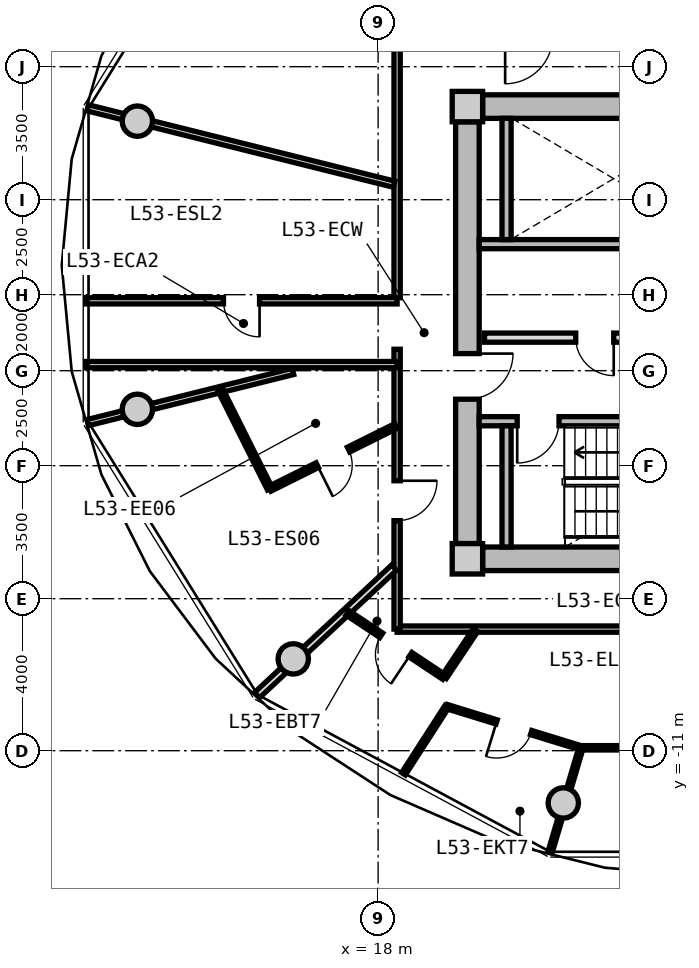
"""IFC4 building model, lengths in metres.
Left out: names, types, materials, properties, quantities, classifications, styles, units other than length and angle.
Written with IfcOpenShell. Run it as: python <this file> out.ifc"""

import sys

from ifc_helpers import new_model, si_unit, direction, frame, frame_2d, origin, origin_2d, place, context, subcontext, project, spatial, rectangle, circle, extrude, source, transform, mapped, element, fill, save


model = new_model("IFC4")
c1 = context("Model", 3, precision=1e-05, world=origin(), true_north=direction((0.0, 1.0)))
c2 = subcontext(c1, "Body", "Model", "MODEL_VIEW")
j1 = project(units=[si_unit("LENGTHUNIT", "METRE"), si_unit("PLANEANGLEUNIT", "RADIAN")], contexts=[c1])
p1 = place(None, origin())
s1 = spatial("IfcSite", under=j1, at=p1, CompositionType="ELEMENT")
p2 = place(p1, origin())
s2 = spatial("IfcBuilding", under=s1, at=p2, CompositionType="ELEMENT")
p3 = place(p2, frame((0.0, 0.0, 170.9)))
s3 = spatial("IfcBuildingStorey", under=s2, at=p3, CompositionType="ELEMENT", Elevation=170.9)
m1 = source(origin(), c2, "Body", "SweptSolid", [
    extrude(rectangle(XDim=0.8, YDim=0.8, at=origin_2d()), origin(), (0.0, 0.0, 1.0), 3.05),
])
for number, where, z_axis, x_axis in (
    (1, (20.35, -5.95, 0.0), (0.0, 0.0, 1.0), (1.0, 0.0, 0.0)),
    (2, (20.35, 5.95, 0.0), (0.0, 0.0, 1.0), (1.0, 0.0, 0.0)),
):
    element("IfcColumn", number, at=place(p3, frame(where, z_axis=z_axis, x_axis=x_axis)), inside=s3, PredefinedType="COLUMN", context=c2, shape_type="MappedRepresentation", body=[
        mapped(m1, transform((0.0, 0.0, 0.0), x_axis=(1.0, 0.0, 0.0), y_axis=(0.0, 1.0, 0.0), z_axis=(0.0, 0.0, 1.0), scale=1.0)),
    ])
m2 = source(origin(), c2, "Body", "SweptSolid", [
    extrude(rectangle(XDim=14.5, YDim=0.62, at=frame_2d((7.25, 0.0))), origin(), (0.0, 0.0, 1.0), 2.81),
])
for number, where, z_axis, x_axis in (
    (3, (20.75, 5.95, 0.0), (0.0, 0.0, 1.0), (1.0, 0.0, 0.0)),
    (4, (35.25, -5.95, 0.0), (0.0, 0.0, 1.0), (-1.0, 0.0, 0.0)),
):
    element("IfcWall", number, at=place(p3, frame(where, z_axis=z_axis, x_axis=x_axis)), inside=s3, PredefinedType="SHEAR", context=c2, shape_type="MappedRepresentation", body=[
        mapped(m2, transform((0.0, 0.0, 0.0), x_axis=(1.0, 0.0, 0.0), y_axis=(0.0, 1.0, 0.0), z_axis=(0.0, 0.0, 1.0), scale=1.0)),
    ])
m3 = source(origin(), c2, "Body", "SweptSolid", [
    extrude(rectangle(XDim=11.1, YDim=0.62, at=frame_2d((5.55, 0.0))), origin(), (0.0, 0.0, 1.0), 2.81),
])
p4 = place(p3, frame((20.35, -5.55, 0.0), z_axis=(0.0, 0.0, 1.0), x_axis=(0.0, 1.0, 0.0)))
e5 = element("IfcWall", 5, at=p4, inside=s3, PredefinedType="SHEAR", context=c2, shape_type="MappedRepresentation", body=[
    mapped(m3, transform((0.0, 0.0, 0.0), x_axis=(1.0, 0.0, 0.0), y_axis=(0.0, 1.0, 0.0), z_axis=(0.0, 0.0, 1.0), scale=1.0)),
])
p5 = place(p4, frame((3.8, 0.0, 0.0)))
e6 = element("IfcOpeningElement", 6, at=p5, cuts=e5, PredefinedType="OPENING", context=c2, shape_type="SweptSolid", body=[
    extrude(rectangle(XDim=1.2, YDim=2.15, at=frame_2d((0.6, 1.075))), frame((0.0, 0.32, 0.0), z_axis=(0.0, -1.0, 0.0), x_axis=(1.0, 0.0, 0.0)), (0.0, 0.0, 1.0), 0.64),
])
m4 = source(origin(), c2, "Body", "SweptSolid", [
    extrude(circle(Radius=0.4, at=origin_2d()), origin(), (0.0, 0.0, 1.0), 3.05),
])
for number, where, z_axis, x_axis in (
    (7, (11.665, 5.567, 0.0), (0.0, 0.0, 1.0), (1.0, 0.0, 0.0)),
    (8, (11.665, -2.016, 0.0), (0.0, 0.0, 1.0), (1.0, 0.0, 0.0)),
    (9, (15.767, -8.584, 0.0), (0.0, 0.0, 1.0), (1.0, 0.0, 0.0)),
    (10, (22.873, -12.375, 0.0), (0.0, 0.0, 1.0), (1.0, 0.0, 0.0)),
):
    element("IfcColumn", number, at=place(p3, frame(where, z_axis=z_axis, x_axis=x_axis)), inside=s3, PredefinedType="COLUMN", context=c2, shape_type="MappedRepresentation", body=[
        mapped(m4, transform((0.0, 0.0, 0.0), x_axis=(1.0, 0.0, 0.0), y_axis=(0.0, 1.0, 0.0), z_axis=(0.0, 0.0, 1.0), scale=1.0)),
    ])
m5 = source(origin(), c2, "Body", "SweptSolid", [
    extrude(rectangle(XDim=7.88, YDim=0.24, at=frame_2d((3.94, 0.0))), origin(), (0.0, 0.0, 1.0), 2.81),
])
p6 = place(p3, frame((20.66, 2.33, 0.0), z_axis=(0.0, 0.0, 1.0), x_axis=(1.0, 0.0, 0.0)))
e11 = element("IfcWall", 11, at=p6, inside=s3, PredefinedType="PARTITIONING", context=c2, shape_type="MappedRepresentation", body=[
    mapped(m5, transform((0.0, 0.0, 0.0), x_axis=(1.0, 0.0, 0.0), y_axis=(0.0, 1.0, 0.0), z_axis=(0.0, 0.0, 1.0), scale=1.0)),
])
m6 = source(origin(), c2, "Body", "SweptSolid", [
    extrude(rectangle(XDim=3.19, YDim=0.24, at=frame_2d((1.595, 0.0))), origin(), (0.0, 0.0, 1.0), 2.81),
])
p7 = place(p3, frame((21.38, 2.45, 0.0), z_axis=(0.0, 0.0, 1.0), x_axis=(0.0, 1.0, 0.0)))
e12 = element("IfcWall", 12, at=p7, inside=s3, PredefinedType="PARTITIONING", context=c2, shape_type="MappedRepresentation", body=[
    mapped(m6, transform((0.0, 0.0, 0.0), x_axis=(1.0, 0.0, 0.0), y_axis=(0.0, 1.0, 0.0), z_axis=(0.0, 0.0, 1.0), scale=1.0)),
])
p8 = place(p3, frame((20.66, -2.33, 0.0), z_axis=(0.0, 0.0, 1.0), x_axis=(1.0, 0.0, 0.0)))
e13 = element("IfcWall", 13, at=p8, inside=s3, PredefinedType="PARTITIONING", context=c2, shape_type="MappedRepresentation", body=[
    mapped(m5, transform((0.0, 0.0, 0.0), x_axis=(1.0, 0.0, 0.0), y_axis=(0.0, 1.0, 0.0), z_axis=(0.0, 0.0, 1.0), scale=1.0)),
])
p9 = place(p8, frame((1.0, 0.0, 0.0)))
e14 = element("IfcOpeningElement", 14, at=p9, cuts=e13, PredefinedType="OPENING", context=c2, shape_type="SweptSolid", body=[
    extrude(rectangle(XDim=1.1, YDim=2.15, at=frame_2d((0.55, 1.075))), frame((0.0, 0.13, 0.0), z_axis=(0.0, -1.0, 0.0), x_axis=(1.0, 0.0, 0.0)), (0.0, 0.0, 1.0), 0.26),
])
p10 = place(p3, frame((21.38, -5.64, 0.0), z_axis=(0.0, 0.0, 1.0), x_axis=(0.0, 1.0, 0.0)))
e15 = element("IfcWall", 15, at=p10, inside=s3, PredefinedType="PARTITIONING", context=c2, shape_type="MappedRepresentation", body=[
    mapped(m6, transform((0.0, 0.0, 0.0), x_axis=(1.0, 0.0, 0.0), y_axis=(0.0, 1.0, 0.0), z_axis=(0.0, 0.0, 1.0), scale=1.0)),
])
m7 = source(origin(), c2, "Body", "SweptSolid", [
    extrude(rectangle(XDim=7.62, YDim=0.24, at=frame_2d((3.81, 0.0))), origin(), (0.0, 0.0, 1.0), 2.795),
])
p11 = place(p3, frame((20.8, -0.13, 0.0), z_axis=(0.0, 0.0, 1.0), x_axis=(1.0, 0.0, 0.0)))
e16 = element("IfcWall", 16, at=p11, inside=s3, PredefinedType="PARTITIONING", context=c2, shape_type="MappedRepresentation", body=[
    mapped(m7, transform((0.0, 0.0, 0.0), x_axis=(1.0, 0.0, 0.0), y_axis=(0.0, 1.0, 0.0), z_axis=(0.0, 0.0, 1.0), scale=1.0)),
])
p12 = place(p11, frame((6.22, 0.0, 0.0)))
e17 = element("IfcOpeningElement", 17, at=p12, cuts=e16, PredefinedType="OPENING", context=c2, shape_type="SweptSolid", body=[
    extrude(rectangle(XDim=1.0, YDim=2.1, at=frame_2d((0.5, 1.05))), frame((0.0, 0.13, 0.0), z_axis=(0.0, -1.0, 0.0), x_axis=(1.0, 0.0, 0.0)), (0.0, 0.0, 1.0), 0.26),
])
p13 = place(p11, frame((2.4, 0.0, 0.0)))
e18 = element("IfcOpeningElement", 18, at=p13, cuts=e16, PredefinedType="OPENING", context=c2, shape_type="SweptSolid", body=[
    extrude(rectangle(XDim=1.0, YDim=2.1, at=frame_2d((0.5, 1.05))), frame((0.0, 0.13, 0.0), z_axis=(0.0, -1.0, 0.0), x_axis=(1.0, 0.0, 0.0)), (0.0, 0.0, 1.0), 0.26),
])
m8 = source(origin(), c2, "Body", "SweptSolid", [
    extrude(rectangle(XDim=19.0, YDim=0.165, at=frame_2d((9.5, 0.0))), origin(), (0.0, 0.0, 1.0), 2.795),
])
p14 = place(p3, frame((37.5, -7.8, 0.0), z_axis=(0.0, 0.0, 1.0), x_axis=(-1.0, 0.0, 0.0)))
e19 = element("IfcWall", 19, at=p14, inside=s3, PredefinedType="PARTITIONING", context=c2, shape_type="MappedRepresentation", body=[
    mapped(m8, transform((0.0, 0.0, 0.0), x_axis=(1.0, 0.0, 0.0), y_axis=(0.0, 1.0, 0.0), z_axis=(0.0, 0.0, 1.0), scale=1.0)),
])
p15 = place(p14, frame((8.061, 0.0, 0.0)))
e20 = element("IfcOpeningElement", 20, at=p15, cuts=e19, PredefinedType="OPENING", context=c2, shape_type="SweptSolid", body=[
    extrude(rectangle(XDim=1.05, YDim=2.15, at=frame_2d((0.525, 1.075))), frame((0.0, 0.093, 0.0), z_axis=(0.0, -1.0, 0.0), x_axis=(1.0, 0.0, 0.0)), (0.0, 0.0, 1.0), 0.185),
])
m9 = source(origin(), c2, "Body", "SweptSolid", [
    extrude(rectangle(XDim=7.365, YDim=0.165, at=frame_2d((3.682, 0.0))), origin(), (0.0, 0.0, 1.0), 2.795),
])
p16 = place(p3, frame((18.5, -7.8, 0.0), z_axis=(0.0, 0.0, 1.0), x_axis=(0.0, 1.0, 0.0)))
e21 = element("IfcWall", 21, at=p16, inside=s3, PredefinedType="PARTITIONING", context=c2, shape_type="MappedRepresentation", body=[
    mapped(m9, transform((0.0, 0.0, 0.0), x_axis=(1.0, 0.0, 0.0), y_axis=(0.0, 1.0, 0.0), z_axis=(0.0, 0.0, 1.0), scale=1.0)),
])
p17 = place(p16, frame((2.854, 0.0, 0.0)))
e22 = element("IfcOpeningElement", 22, at=p17, cuts=e21, PredefinedType="OPENING", context=c2, shape_type="SweptSolid", body=[
    extrude(rectangle(XDim=1.05, YDim=2.15, at=frame_2d((0.525, 1.075))), frame((0.0, 0.093, 0.0), z_axis=(0.0, -1.0, 0.0), x_axis=(1.0, 0.0, 0.0)), (0.0, 0.0, 1.0), 0.185),
])
m10 = source(origin(), c2, "Body", "SweptSolid", [
    extrude(rectangle(XDim=6.88, YDim=0.165, at=frame_2d((3.44, 0.0))), origin(), (0.0, 0.0, 1.0), 2.795),
])
p18 = place(p3, frame((18.5, 0.92, 0.0), z_axis=(0.0, 0.0, 1.0), x_axis=(0.0, 1.0, 0.0)))
e23 = element("IfcWall", 23, at=p18, inside=s3, PredefinedType="PARTITIONING", context=c2, shape_type="MappedRepresentation", body=[
    mapped(m10, transform((0.0, 0.0, 0.0), x_axis=(1.0, 0.0, 0.0), y_axis=(0.0, 1.0, 0.0), z_axis=(0.0, 0.0, 1.0), scale=1.0)),
])
m11 = source(origin(), c2, "Body", "SweptSolid", [
    extrude(rectangle(XDim=8.305, YDim=0.165, at=frame_2d((4.153, 0.0))), origin(), (0.0, 0.0, 1.0), 2.345),
])
p19 = place(p3, frame((18.42, 3.908, 0.0), z_axis=(0.0, 0.0, 1.0), x_axis=(-0.970309994378, 0.241864662175, 0.0)))
e24 = element("IfcWall", 24, at=p19, inside=s3, PredefinedType="PARTITIONING", context=c2, shape_type="MappedRepresentation", body=[
    mapped(m11, transform((0.0, 0.0, 0.0), x_axis=(1.0, 0.0, 0.0), y_axis=(0.0, 1.0, 0.0), z_axis=(0.0, 0.0, 1.0), scale=1.0)),
])
m12 = source(origin(), c2, "Body", "SweptSolid", [
    extrude(rectangle(XDim=5.564, YDim=0.165, at=frame_2d((2.782, 0.0))), origin(), (0.0, 0.0, 1.0), 2.345),
])
p20 = place(p3, frame((15.76, -1.02, 0.0), z_axis=(0.0, 0.0, 1.0), x_axis=(-0.970315176167, -0.241843872984, 0.0)))
e25 = element("IfcWall", 25, at=p20, inside=s3, PredefinedType="PARTITIONING", context=c2, shape_type="MappedRepresentation", body=[
    mapped(m12, transform((0.0, 0.0, 0.0), x_axis=(1.0, 0.0, 0.0), y_axis=(0.0, 1.0, 0.0), z_axis=(0.0, 0.0, 1.0), scale=1.0)),
])
m13 = source(origin(), c2, "Body", "SweptSolid", [
    extrude(rectangle(XDim=8.189, YDim=0.165, at=frame_2d((4.094, 0.0))), origin(), (0.0, 0.0, 1.0), 2.795),
])
p21 = place(p3, frame((10.311, 0.84, 0.0), z_axis=(0.0, 0.0, 1.0), x_axis=(1.0, 0.0, 0.0)))
e26 = element("IfcWall", 26, at=p21, inside=s3, PredefinedType="PARTITIONING", context=c2, shape_type="MappedRepresentation", body=[
    mapped(m13, transform((0.0, 0.0, 0.0), x_axis=(1.0, 0.0, 0.0), y_axis=(0.0, 1.0, 0.0), z_axis=(0.0, 0.0, 1.0), scale=1.0)),
])
p22 = place(p21, frame((3.619, 0.0, 0.0)))
e27 = element("IfcOpeningElement", 27, at=p22, cuts=e26, PredefinedType="OPENING", context=c2, shape_type="SweptSolid", body=[
    extrude(rectangle(XDim=0.95, YDim=2.1, at=frame_2d((0.475, 1.05))), frame((0.0, 0.093, 0.0), z_axis=(0.0, -1.0, 0.0), x_axis=(1.0, 0.0, 0.0)), (0.0, 0.0, 1.0), 0.185),
])
p23 = place(p3, frame((18.5, -0.84, 0.0), z_axis=(0.0, 0.0, 1.0), x_axis=(-1.0, 0.0, 0.0)))
e28 = element("IfcWall", 28, at=p23, inside=s3, PredefinedType="PARTITIONING", context=c2, shape_type="MappedRepresentation", body=[
    mapped(m13, transform((0.0, 0.0, 0.0), x_axis=(1.0, 0.0, 0.0), y_axis=(0.0, 1.0, 0.0), z_axis=(0.0, 0.0, 1.0), scale=1.0)),
])
m14 = source(origin(), c2, "Body", "SweptSolid", [
    extrude(rectangle(XDim=4.927, YDim=0.19, at=frame_2d((2.463, 0.0))), origin(), (0.0, 0.0, 1.0), 2.345),
])
p24 = place(p3, frame((18.42, -6.183, 0.0), z_axis=(0.0, 0.0, 1.0), x_axis=(-0.732191335987, -0.681098999783, 0.0)))
e29 = element("IfcWall", 29, at=p24, inside=s3, PredefinedType="PARTITIONING", context=c2, shape_type="MappedRepresentation", body=[
    mapped(m14, transform((0.0, 0.0, 0.0), x_axis=(1.0, 0.0, 0.0), y_axis=(0.0, 1.0, 0.0), z_axis=(0.0, 0.0, 1.0), scale=1.0)),
])
m15 = source(origin(), c2, "Body", "SweptSolid", [
    extrude(rectangle(XDim=3.707, YDim=0.14, at=frame_2d((1.854, 0.0))), origin(), (0.0, 0.0, 1.0), 2.795),
])
p25 = place(p3, frame((18.47, -2.456, 0.0), z_axis=(0.0, 0.0, 1.0), x_axis=(-0.895347377717, -0.44536846904, 0.0)))
e30 = element("IfcWall", 30, at=p25, inside=s3, PredefinedType="PARTITIONING", context=c2, shape_type="MappedRepresentation", body=[
    mapped(m15, transform((0.0, 0.0, 0.0), x_axis=(1.0, 0.0, 0.0), y_axis=(0.0, 1.0, 0.0), z_axis=(0.0, 0.0, 1.0), scale=1.0)),
])
p26 = place(p25, frame((1.394, 0.0, 0.0)))
e31 = element("IfcOpeningElement", 31, at=p26, cuts=e30, PredefinedType="OPENING", context=c2, shape_type="SweptSolid", body=[
    extrude(rectangle(XDim=0.92, YDim=2.1, at=frame_2d((0.46, 1.05))), frame((0.0, 0.08, 0.0), z_axis=(0.0, -1.0, 0.0), x_axis=(1.0, 0.0, 0.0)), (0.0, 0.0, 1.0), 0.16),
])
m16 = source(origin(), c2, "Body", "SweptSolid", [
    extrude(rectangle(XDim=2.918, YDim=0.14, at=frame_2d((1.459, 0.0))), origin(), (0.0, 0.0, 1.0), 2.795),
])
p27 = place(p3, frame((15.151, -4.107, 0.0), z_axis=(0.0, 0.0, 1.0), x_axis=(-0.447146668647, 0.894460651296, 0.0)))
e32 = element("IfcWall", 32, at=p27, inside=s3, PredefinedType="PARTITIONING", context=c2, shape_type="MappedRepresentation", body=[
    mapped(m16, transform((0.0, 0.0, 0.0), x_axis=(1.0, 0.0, 0.0), y_axis=(0.0, 1.0, 0.0), z_axis=(0.0, 0.0, 1.0), scale=1.0)),
])
m17 = source(origin(), c2, "Body", "SweptSolid", [
    extrude(rectangle(XDim=7.274, YDim=0.115, at=frame_2d((3.637, 0.0))), origin(), (0.0, 0.0, 1.0), 2.795),
])
p28 = place(p3, frame((23.338, -10.924, 0.0), z_axis=(0.0, 0.0, 1.0), x_axis=(1.0, 0.0, 0.0)))
e33 = element("IfcWall", 33, at=p28, inside=s3, PredefinedType="PARTITIONING", context=c2, shape_type="MappedRepresentation", body=[
    mapped(m17, transform((0.0, 0.0, 0.0), x_axis=(1.0, 0.0, 0.0), y_axis=(0.0, 1.0, 0.0), z_axis=(0.0, 0.0, 1.0), scale=1.0)),
])
p29 = place(p28, frame((3.162, 0.0, 0.0)))
e34 = element("IfcOpeningElement", 34, at=p29, cuts=e33, PredefinedType="OPENING", context=c2, shape_type="SweptSolid", body=[
    extrude(rectangle(XDim=0.95, YDim=2.1, at=frame_2d((0.475, 1.05))), frame((0.0, 0.067, 0.0), z_axis=(0.0, -1.0, 0.0), x_axis=(1.0, 0.0, 0.0)), (0.0, 0.0, 1.0), 0.135),
])
m18 = source(origin(), c2, "Body", "SweptSolid", [
    extrude(rectangle(XDim=2.874, YDim=0.115, at=frame_2d((1.437, 0.0))), origin(), (0.0, 0.0, 1.0), 2.345),
])
p30 = place(p3, frame((23.338, -10.924, 0.0), z_axis=(0.0, 0.0, 1.0), x_axis=(-0.283573427988, -0.958950525804, 0.0)))
e35 = element("IfcWall", 35, at=p30, inside=s3, PredefinedType="PARTITIONING", context=c2, shape_type="MappedRepresentation", body=[
    mapped(m18, transform((0.0, 0.0, 0.0), x_axis=(1.0, 0.0, 0.0), y_axis=(0.0, 1.0, 0.0), z_axis=(0.0, 0.0, 1.0), scale=1.0)),
])
m19 = source(origin(), c2, "Body", "SweptSolid", [
    extrude(rectangle(XDim=1.482, YDim=0.14, at=frame_2d((0.741, 0.0))), origin(), (0.0, 0.0, 1.0), 2.795),
])
p31 = place(p3, frame((20.56, -7.83, 0.0), z_axis=(0.0, 0.0, 1.0), x_axis=(-0.555308105158, -0.831644700786, 0.0)))
e36 = element("IfcWall", 36, at=p31, inside=s3, PredefinedType="PARTITIONING", context=c2, shape_type="MappedRepresentation", body=[
    mapped(m19, transform((0.0, 0.0, 0.0), x_axis=(1.0, 0.0, 0.0), y_axis=(0.0, 1.0, 0.0), z_axis=(0.0, 0.0, 1.0), scale=1.0)),
])
m20 = source(origin(), c2, "Body", "SweptSolid", [
    extrude(rectangle(XDim=3.051, YDim=0.14, at=frame_2d((1.525, 0.0))), origin(), (0.0, 0.0, 1.0), 2.795),
])
p32 = place(p3, frame((19.737, -9.063, 0.0), z_axis=(0.0, 0.0, 1.0), x_axis=(-0.832763694299, 0.553628602456, 0.0)))
e37 = element("IfcWall", 37, at=p32, inside=s3, PredefinedType="PARTITIONING", context=c2, shape_type="MappedRepresentation", body=[
    mapped(m20, transform((0.0, 0.0, 0.0), x_axis=(1.0, 0.0, 0.0), y_axis=(0.0, 1.0, 0.0), z_axis=(0.0, 0.0, 1.0), scale=1.0)),
])
p33 = place(p32, frame((1.065, 0.0, 0.0)))
e38 = element("IfcOpeningElement", 38, at=p33, cuts=e37, PredefinedType="OPENING", context=c2, shape_type="SweptSolid", body=[
    extrude(rectangle(XDim=0.92, YDim=2.1, at=frame_2d((0.46, 1.05))), frame((0.0, 0.08, 0.0), z_axis=(0.0, -1.0, 0.0), x_axis=(1.0, 0.0, 0.0)), (0.0, 0.0, 1.0), 0.16),
])
m21 = source(origin(), c2, "Body", "SweptSolid", [
    extrude(rectangle(XDim=2.105, YDim=0.115, at=frame_2d((1.052, 0.0))), origin(), (0.0, 0.0, 1.0), 2.795),
])
p34 = place(p3, frame((19.808, -9.839, 0.0), z_axis=(0.0, 0.0, 1.0), x_axis=(-0.541542884204, -0.840673125875, 0.0)))
e39 = element("IfcWall", 39, at=p34, inside=s3, PredefinedType="PARTITIONING", context=c2, shape_type="MappedRepresentation", body=[
    mapped(m21, transform((0.0, 0.0, 0.0), x_axis=(1.0, 0.0, 0.0), y_axis=(0.0, 1.0, 0.0), z_axis=(0.0, 0.0, 1.0), scale=1.0)),
])
m22 = source(origin(), c2, "Body", "SweptSolid", [
    extrude(rectangle(XDim=3.693, YDim=0.115, at=frame_2d((1.847, 0.0))), origin(), (0.0, 0.0, 1.0), 2.795),
])
p35 = place(p3, frame((19.808, -9.839, 0.0), z_axis=(0.0, 0.0, 1.0), x_axis=(0.955691778506, -0.294369197599, 0.0)))
e40 = element("IfcWall", 40, at=p35, inside=s3, PredefinedType="PARTITIONING", context=c2, shape_type="MappedRepresentation", body=[
    mapped(m22, transform((0.0, 0.0, 0.0), x_axis=(1.0, 0.0, 0.0), y_axis=(0.0, 1.0, 0.0), z_axis=(0.0, 0.0, 1.0), scale=1.0)),
])
p36 = place(p35, frame((1.372, 0.0, 0.0)))
e41 = element("IfcOpeningElement", 41, at=p36, cuts=e40, PredefinedType="OPENING", context=c2, shape_type="SweptSolid", body=[
    extrude(rectangle(XDim=0.95, YDim=2.1, at=frame_2d((0.475, 1.05))), frame((0.0, 0.067, 0.0), z_axis=(0.0, -1.0, 0.0), x_axis=(1.0, 0.0, 0.0)), (0.0, 0.0, 1.0), 0.135),
])
m23 = source(origin(), c2, "Body", "SweptSolid", [
    extrude(rectangle(XDim=1.1, YDim=2.15, at=frame_2d((0.55, 1.075))), frame((0.0, 0.025, 0.0), z_axis=(0.0, -1.0, 0.0), x_axis=(1.0, 0.0, 0.0)), (0.0, 0.0, 1.0), 0.05),
])
p37 = place(p9, frame((1.1, 0.0, 0.0), z_axis=(0.0, 0.0, 1.0), x_axis=(-1.0, 0.0, 0.0)))
e42 = element("IfcDoor", 42, at=p37, inside=s3, OperationType="SINGLE_SWING_RIGHT", PredefinedType="DOOR", context=c2, shape_type="MappedRepresentation", body=[
    mapped(m23, transform((0.0, 0.0, 0.0), x_axis=(1.0, 0.0, 0.0), y_axis=(0.0, 1.0, 0.0), z_axis=(0.0, 0.0, 1.0), scale=1.0)),
])
fill(e14, e42)
m24 = source(origin(), c2, "Body", "SweptSolid", [
    extrude(rectangle(XDim=1.2, YDim=2.15, at=frame_2d((0.6, 1.075))), frame((0.0, 0.025, 0.0), z_axis=(0.0, -1.0, 0.0), x_axis=(1.0, 0.0, 0.0)), (0.0, 0.0, 1.0), 0.05),
])
p38 = place(p5, frame((1.2, 0.0, 0.0), z_axis=(0.0, 0.0, 1.0), x_axis=(-1.0, 0.0, 0.0)))
e43 = element("IfcDoor", 43, at=p38, inside=s3, OperationType="SINGLE_SWING_LEFT", PredefinedType="DOOR", context=c2, shape_type="MappedRepresentation", body=[
    mapped(m24, transform((0.0, 0.0, 0.0), x_axis=(1.0, 0.0, 0.0), y_axis=(0.0, 1.0, 0.0), z_axis=(0.0, 0.0, 1.0), scale=1.0)),
])
fill(e6, e43)
m25 = source(origin(), c2, "Body", "SweptSolid", [
    extrude(rectangle(XDim=1.0, YDim=2.1, at=frame_2d((0.5, 1.05))), frame((0.0, 0.025, 0.0), z_axis=(0.0, -1.0, 0.0), x_axis=(1.0, 0.0, 0.0)), (0.0, 0.0, 1.0), 0.05),
])
p39 = place(p13, frame((1.0, 0.0, 0.0), z_axis=(0.0, 0.0, 1.0), x_axis=(-1.0, 0.0, 0.0)))
e44 = element("IfcDoor", 44, at=p39, inside=s3, OperationType="SINGLE_SWING_LEFT", PredefinedType="DOOR", context=c2, shape_type="MappedRepresentation", body=[
    mapped(m25, transform((0.0, 0.0, 0.0), x_axis=(1.0, 0.0, 0.0), y_axis=(0.0, 1.0, 0.0), z_axis=(0.0, 0.0, 1.0), scale=1.0)),
])
fill(e18, e44)
m26 = source(origin(), c2, "Body", "SweptSolid", [
    extrude(rectangle(XDim=0.95, YDim=2.1, at=frame_2d((0.475, 1.05))), frame((0.0, 0.025, 0.0), z_axis=(0.0, -1.0, 0.0), x_axis=(1.0, 0.0, 0.0)), (0.0, 0.0, 1.0), 0.05),
])
p40 = place(p22, frame((0.95, 0.0, 0.0), z_axis=(0.0, 0.0, 1.0), x_axis=(-1.0, 0.0, 0.0)))
e45 = element("IfcDoor", 45, at=p40, inside=s3, OperationType="SINGLE_SWING_LEFT", PredefinedType="DOOR", context=c2, shape_type="MappedRepresentation", body=[
    mapped(m26, transform((0.0, 0.0, 0.0), x_axis=(1.0, 0.0, 0.0), y_axis=(0.0, 1.0, 0.0), z_axis=(0.0, 0.0, 1.0), scale=1.0)),
])
fill(e27, e45)
m27 = source(origin(), c2, "Body", "SweptSolid", [
    extrude(rectangle(XDim=1.05, YDim=2.15, at=frame_2d((0.525, 1.075))), frame((0.0, 0.025, 0.0), z_axis=(0.0, -1.0, 0.0), x_axis=(1.0, 0.0, 0.0)), (0.0, 0.0, 1.0), 0.05),
])
p41 = place(p17, frame((1.05, 0.0, 0.0), z_axis=(0.0, 0.0, 1.0), x_axis=(-1.0, 0.0, 0.0)))
e46 = element("IfcDoor", 46, at=p41, inside=s3, OperationType="SINGLE_SWING_LEFT", PredefinedType="DOOR", context=c2, shape_type="MappedRepresentation", body=[
    mapped(m27, transform((0.0, 0.0, 0.0), x_axis=(1.0, 0.0, 0.0), y_axis=(0.0, 1.0, 0.0), z_axis=(0.0, 0.0, 1.0), scale=1.0)),
])
fill(e22, e46)
m28 = source(origin(), c2, "Body", "SweptSolid", [
    extrude(rectangle(XDim=0.92, YDim=2.1, at=frame_2d((0.46, 1.05))), frame((0.0, 0.025, 0.0), z_axis=(0.0, -1.0, 0.0), x_axis=(1.0, 0.0, 0.0)), (0.0, 0.0, 1.0), 0.05),
])
p42 = place(p26, origin())
e47 = element("IfcDoor", 47, at=p42, inside=s3, OperationType="SINGLE_SWING_RIGHT", PredefinedType="DOOR", context=c2, shape_type="MappedRepresentation", body=[
    mapped(m28, transform((0.0, 0.0, 0.0), x_axis=(1.0, 0.0, 0.0), y_axis=(0.0, 1.0, 0.0), z_axis=(0.0, 0.0, 1.0), scale=1.0)),
])
fill(e31, e47)
p43 = place(p33, origin())
e48 = element("IfcDoor", 48, at=p43, inside=s3, OperationType="SINGLE_SWING_LEFT", PredefinedType="DOOR", context=c2, shape_type="MappedRepresentation", body=[
    mapped(m28, transform((0.0, 0.0, 0.0), x_axis=(1.0, 0.0, 0.0), y_axis=(0.0, 1.0, 0.0), z_axis=(0.0, 0.0, 1.0), scale=1.0)),
])
fill(e38, e48)
p44 = place(p36, frame((0.95, 0.0, 0.0), z_axis=(0.0, 0.0, 1.0), x_axis=(-1.0, 0.0, 0.0)))
e49 = element("IfcDoor", 49, at=p44, inside=s3, OperationType="SINGLE_SWING_RIGHT", PredefinedType="DOOR", context=c2, shape_type="MappedRepresentation", body=[
    mapped(m26, transform((0.0, 0.0, 0.0), x_axis=(1.0, 0.0, 0.0), y_axis=(0.0, 1.0, 0.0), z_axis=(0.0, 0.0, 1.0), scale=1.0)),
])
fill(e41, e49)
save(model, sys.argv[1])
